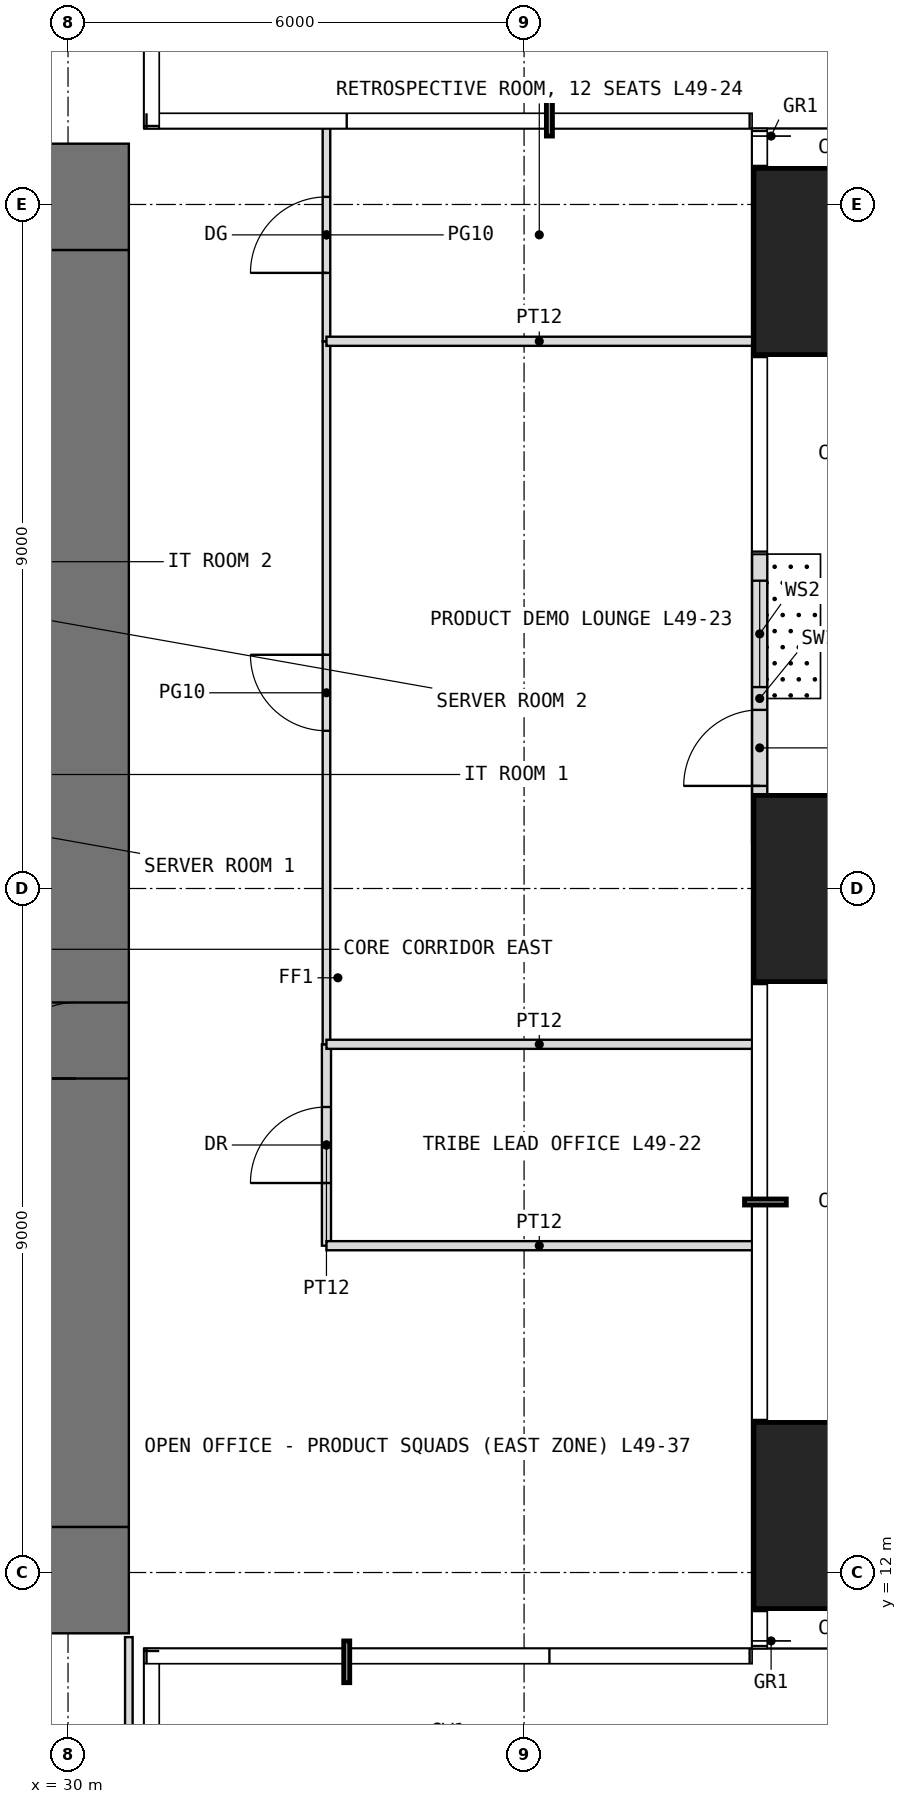
"""IFC4 building model, lengths in metres.
Left out: names, types, materials, properties, quantities, classifications, styles, units other than length and angle.
Written with IfcOpenShell. Run it as: python <this file> out.ifc"""

import sys

from ifc_helpers import new_model, si_unit, direction, frame, frame_2d, origin, origin_2d, place, context, subcontext, project, spatial, rectangle, extrude, element, fill, save


model = new_model("IFC4")
c1 = context("Model", 3, precision=1e-05, world=origin(), true_north=direction((0.0, 1.0)))
c2 = subcontext(c1, "Body", "Model", "MODEL_VIEW")
j1 = project(units=[si_unit("LENGTHUNIT", "METRE"), si_unit("PLANEANGLEUNIT", "RADIAN")], contexts=[c1])
p1 = place(None, origin())
s1 = spatial("IfcSite", under=j1, at=p1, CompositionType="ELEMENT")
p2 = place(p1, origin())
s2 = spatial("IfcBuilding", under=s1, at=p2, CompositionType="ELEMENT")
p3 = place(p2, frame((0.0, 0.0, 206.5)))
s3 = spatial("IfcBuildingStorey", under=s2, at=p3, CompositionType="ELEMENT", Elevation=206.5)
for number, where, z_axis, x_axis in (
    (1, (40.25, 12.75, 0.0), (0.0, 0.0, 1.0), (1.0, 0.0, 0.0)),
    (2, (40.25, 21.0, 0.0), (0.0, 0.0, 1.0), (1.0, 0.0, 0.0)),
    (3, (40.25, 29.25, 0.0), (0.0, 0.0, 1.0), (1.0, 0.0, 0.0)),
):
    element("IfcColumn", number, at=place(p3, frame(where, z_axis=z_axis, x_axis=x_axis)), inside=s3, PredefinedType="COLUMN", context=c2, shape_type="SweptSolid", body=[
        extrude(rectangle(XDim=2.45, YDim=2.45, at=origin_2d()), origin(), (0.0, 0.0, 1.0), 4.0),
    ])
p4 = place(p3, frame((39.1, 21.6, 0.0), z_axis=(0.0, 0.0, 1.0), x_axis=(0.0, 1.0, 0.0)))
e4 = element("IfcWall", 4, at=p4, inside=s3, PredefinedType="USERDEFINED", context=c2, shape_type="SweptSolid", body=[
    extrude(rectangle(XDim=3.8, YDim=0.2, at=frame_2d((1.9, 0.0))), origin(), (0.0, 0.0, 1.0), 3.75),
])
p5 = place(p4, frame((0.75, 0.0, 0.0)))
e5 = element("IfcOpeningElement", 5, at=p5, cuts=e4, PredefinedType="OPENING", context=c2, shape_type="SweptSolid", body=[
    extrude(rectangle(XDim=1.0, YDim=2.4, at=frame_2d((0.5, 1.2))), frame((0.0, 0.11, 0.0), z_axis=(0.0, -1.0, 0.0), x_axis=(1.0, 0.0, 0.0)), (0.0, 0.0, 1.0), 0.22),
])
p6 = place(p4, frame((2.05, 0.0, 0.3)))
e6 = element("IfcOpeningElement", 6, at=p6, cuts=e4, PredefinedType="OPENING", context=c2, shape_type="SweptSolid", body=[
    extrude(rectangle(XDim=1.4, YDim=2.7, at=frame_2d((0.7, 1.35))), frame((0.0, 0.11, 0.0), z_axis=(0.0, -1.0, 0.0), x_axis=(1.0, 0.0, 0.0)), (0.0, 0.0, 1.0), 0.22),
])
p7 = place(p3, frame((11.2, 11.9, -0.05), z_axis=(0.0, 0.0, 1.0), x_axis=(1.0, 0.0, 0.0)))
e7 = element("IfcWall", 7, at=p7, inside=s3, PredefinedType="SHEAR", context=c2, shape_type="SweptSolid", body=[
    extrude(rectangle(XDim=19.6, YDim=1.4, at=frame_2d((9.8, 0.0))), origin(), (0.0, 0.0, 1.0), 4.0),
])
p8 = place(p7, frame((8.8, 0.0, 0.05)))
e8 = element("IfcOpeningElement", 8, at=p8, cuts=e7, PredefinedType="OPENING", context=c2, shape_type="SweptSolid", body=[
    extrude(rectangle(XDim=2.0, YDim=2.2, at=frame_2d((1.0, 1.1))), frame((0.0, 0.71, 0.0), z_axis=(0.0, -1.0, 0.0), x_axis=(1.0, 0.0, 0.0)), (0.0, 0.0, 1.0), 1.42),
])
p9 = place(p3, frame((11.2, 30.1, -0.05), z_axis=(0.0, 0.0, 1.0), x_axis=(1.0, 0.0, 0.0)))
e9 = element("IfcWall", 9, at=p9, inside=s3, PredefinedType="SHEAR", context=c2, shape_type="SweptSolid", body=[
    extrude(rectangle(XDim=19.6, YDim=1.4, at=frame_2d((9.8, 0.0))), origin(), (0.0, 0.0, 1.0), 4.0),
])
p10 = place(p9, frame((8.8, 0.0, 0.05)))
e10 = element("IfcOpeningElement", 10, at=p10, cuts=e9, PredefinedType="OPENING", context=c2, shape_type="SweptSolid", body=[
    extrude(rectangle(XDim=2.0, YDim=2.2, at=frame_2d((1.0, 1.1))), frame((0.0, 0.71, 0.0), z_axis=(0.0, -1.0, 0.0), x_axis=(1.0, 0.0, 0.0)), (0.0, 0.0, 1.0), 1.42),
])
p11 = place(p3, frame((30.1, 12.6, -0.05), z_axis=(0.0, 0.0, 1.0), x_axis=(0.0, 1.0, 0.0)))
e11 = element("IfcWall", 11, at=p11, inside=s3, PredefinedType="SHEAR", context=c2, shape_type="SweptSolid", body=[
    extrude(rectangle(XDim=16.8, YDim=1.4, at=frame_2d((8.4, 0.0))), origin(), (0.0, 0.0, 1.0), 4.0),
])
p12 = place(p11, frame((5.9, 0.0, 0.05)))
e12 = element("IfcOpeningElement", 12, at=p12, cuts=e11, PredefinedType="OPENING", context=c2, shape_type="SweptSolid", body=[
    extrude(rectangle(XDim=1.0, YDim=2.2, at=frame_2d((0.5, 1.1))), frame((0.0, 0.71, 0.0), z_axis=(0.0, -1.0, 0.0), x_axis=(1.0, 0.0, 0.0)), (0.0, 0.0, 1.0), 1.42),
])
p13 = place(p3, frame((30.8, 6.8, 0.0), z_axis=(0.0, 0.0, 1.0), x_axis=(0.0, 1.0, 0.0)))
e13 = element("IfcWall", 13, at=p13, inside=s3, PredefinedType="PARTITIONING", context=c2, shape_type="SweptSolid", body=[
    extrude(rectangle(XDim=4.35, YDim=0.1, at=frame_2d((2.175, 0.0))), origin(), (0.0, 0.0, 1.0), 3.75),
])
p14 = place(p3, frame((33.4, 16.3, 0.0), z_axis=(0.0, 0.0, 1.0), x_axis=(0.0, 1.0, 0.0)))
e14 = element("IfcWall", 14, at=p14, inside=s3, PredefinedType="PARTITIONING", context=c2, shape_type="SweptSolid", body=[
    extrude(rectangle(XDim=2.65, YDim=0.12, at=frame_2d((1.325, 0.0))), origin(), (0.0, 0.0, 1.0), 3.75),
])
p15 = place(p14, frame((0.825, 0.0, 0.0)))
e15 = element("IfcOpeningElement", 15, at=p15, cuts=e14, PredefinedType="OPENING", context=c2, shape_type="SweptSolid", body=[
    extrude(rectangle(XDim=1.0, YDim=2.2, at=frame_2d((0.5, 1.1))), frame((0.0, 0.07, 0.0), z_axis=(0.0, -1.0, 0.0), x_axis=(1.0, 0.0, 0.0)), (0.0, 0.0, 1.0), 0.14),
])
p16 = place(p3, frame((33.4, 16.3, 0.0), z_axis=(0.0, 0.0, 1.0), x_axis=(1.0, 0.0, 0.0)))
e16 = element("IfcWall", 16, at=p16, inside=s3, PredefinedType="PARTITIONING", context=c2, shape_type="SweptSolid", body=[
    extrude(rectangle(XDim=5.6, YDim=0.12, at=frame_2d((2.8, 0.0))), origin(), (0.0, 0.0, 1.0), 3.75),
])
p17 = place(p3, frame((33.4, 18.95, 0.0), z_axis=(0.0, 0.0, 1.0), x_axis=(0.0, 1.0, 0.0)))
e17 = element("IfcWall", 17, at=p17, inside=s3, PredefinedType="PARTITIONING", context=c2, shape_type="SweptSolid", body=[
    extrude(rectangle(XDim=9.25, YDim=0.1, at=frame_2d((4.625, 0.0))), origin(), (0.0, 0.0, 1.0), 3.75),
])
p18 = place(p17, frame((4.125, 0.0, 0.0)))
e18 = element("IfcOpeningElement", 18, at=p18, cuts=e17, PredefinedType="OPENING", context=c2, shape_type="SweptSolid", body=[
    extrude(rectangle(XDim=1.0, YDim=2.4, at=frame_2d((0.5, 1.2))), frame((0.0, 0.06, 0.0), z_axis=(0.0, -1.0, 0.0), x_axis=(1.0, 0.0, 0.0)), (0.0, 0.0, 1.0), 0.12),
])
p19 = place(p3, frame((33.4, 18.95, 0.0), z_axis=(0.0, 0.0, 1.0), x_axis=(1.0, 0.0, 0.0)))
e19 = element("IfcWall", 19, at=p19, inside=s3, PredefinedType="PARTITIONING", context=c2, shape_type="SweptSolid", body=[
    extrude(rectangle(XDim=5.6, YDim=0.12, at=frame_2d((2.8, 0.0))), origin(), (0.0, 0.0, 1.0), 3.75),
])
p20 = place(p3, frame((33.4, 28.2, 0.0), z_axis=(0.0, 0.0, 1.0), x_axis=(0.0, 1.0, 0.0)))
e20 = element("IfcWall", 20, at=p20, inside=s3, PredefinedType="PARTITIONING", context=c2, shape_type="SweptSolid", body=[
    extrude(rectangle(XDim=2.8, YDim=0.1, at=frame_2d((1.4, 0.0))), origin(), (0.0, 0.0, 1.0), 3.75),
])
p21 = place(p20, frame((0.9, 0.0, 0.0)))
e21 = element("IfcOpeningElement", 21, at=p21, cuts=e20, PredefinedType="OPENING", context=c2, shape_type="SweptSolid", body=[
    extrude(rectangle(XDim=1.0, YDim=2.4, at=frame_2d((0.5, 1.2))), frame((0.0, 0.06, 0.0), z_axis=(0.0, -1.0, 0.0), x_axis=(1.0, 0.0, 0.0)), (0.0, 0.0, 1.0), 0.12),
])
p22 = place(p3, frame((33.4, 28.2, 0.0), z_axis=(0.0, 0.0, 1.0), x_axis=(1.0, 0.0, 0.0)))
e22 = element("IfcWall", 22, at=p22, inside=s3, PredefinedType="PARTITIONING", context=c2, shape_type="SweptSolid", body=[
    extrude(rectangle(XDim=5.6, YDim=0.12, at=frame_2d((2.8, 0.0))), origin(), (0.0, 0.0, 1.0), 3.75),
])
p23 = place(p5, origin())
e23 = element("IfcDoor", 23, at=p23, inside=s3, OperationType="SINGLE_SWING_LEFT", PredefinedType="DOOR", context=c2, shape_type="SweptSolid", body=[
    extrude(rectangle(XDim=1.0, YDim=2.4, at=frame_2d((0.5, 1.2))), frame((0.0, 0.025, 0.0), z_axis=(0.0, -1.0, 0.0), x_axis=(1.0, 0.0, 0.0)), (0.0, 0.0, 1.0), 0.05),
])
fill(e5, e23)
p24 = place(p6, origin())
e24 = element("IfcWindow", 24, at=p24, inside=s3, PartitioningType="SINGLE_PANEL", PredefinedType="WINDOW", context=c2, shape_type="SweptSolid", body=[
    extrude(rectangle(XDim=1.4, YDim=2.7, at=frame_2d((0.7, 1.35))), frame((0.0, 0.03, 0.0), z_axis=(0.0, -1.0, 0.0), x_axis=(1.0, 0.0, 0.0)), (0.0, 0.0, 1.0), 0.06),
])
fill(e6, e24)
p25 = place(p12, origin())
e25 = element("IfcDoor", 25, at=p25, inside=s3, OperationType="SINGLE_SWING_LEFT", PredefinedType="DOOR", context=c2, shape_type="SweptSolid", body=[
    extrude(rectangle(XDim=1.0, YDim=2.2, at=frame_2d((0.5, 1.1))), frame((0.0, 0.025, 0.0), z_axis=(0.0, -1.0, 0.0), x_axis=(1.0, 0.0, 0.0)), (0.0, 0.0, 1.0), 0.05),
])
fill(e12, e25)
p26 = place(p15, origin())
e26 = element("IfcDoor", 26, at=p26, inside=s3, OperationType="SINGLE_SWING_LEFT", PredefinedType="DOOR", context=c2, shape_type="SweptSolid", body=[
    extrude(rectangle(XDim=1.0, YDim=2.2, at=frame_2d((0.5, 1.1))), frame((0.0, 0.025, 0.0), z_axis=(0.0, -1.0, 0.0), x_axis=(1.0, 0.0, 0.0)), (0.0, 0.0, 1.0), 0.05),
])
fill(e15, e26)
p27 = place(p18, origin())
e27 = element("IfcDoor", 27, at=p27, inside=s3, OperationType="SINGLE_SWING_RIGHT", PredefinedType="DOOR", context=c2, shape_type="SweptSolid", body=[
    extrude(rectangle(XDim=1.0, YDim=2.4, at=frame_2d((0.5, 1.2))), frame((0.0, 0.025, 0.0), z_axis=(0.0, -1.0, 0.0), x_axis=(1.0, 0.0, 0.0)), (0.0, 0.0, 1.0), 0.05),
])
fill(e18, e27)
p28 = place(p21, origin())
e28 = element("IfcDoor", 28, at=p28, inside=s3, OperationType="SINGLE_SWING_LEFT", PredefinedType="DOOR", context=c2, shape_type="SweptSolid", body=[
    extrude(rectangle(XDim=1.0, YDim=2.4, at=frame_2d((0.5, 1.2))), frame((0.0, 0.025, 0.0), z_axis=(0.0, -1.0, 0.0), x_axis=(1.0, 0.0, 0.0)), (0.0, 0.0, 1.0), 0.05),
])
fill(e21, e28)
save(model, sys.argv[1])
